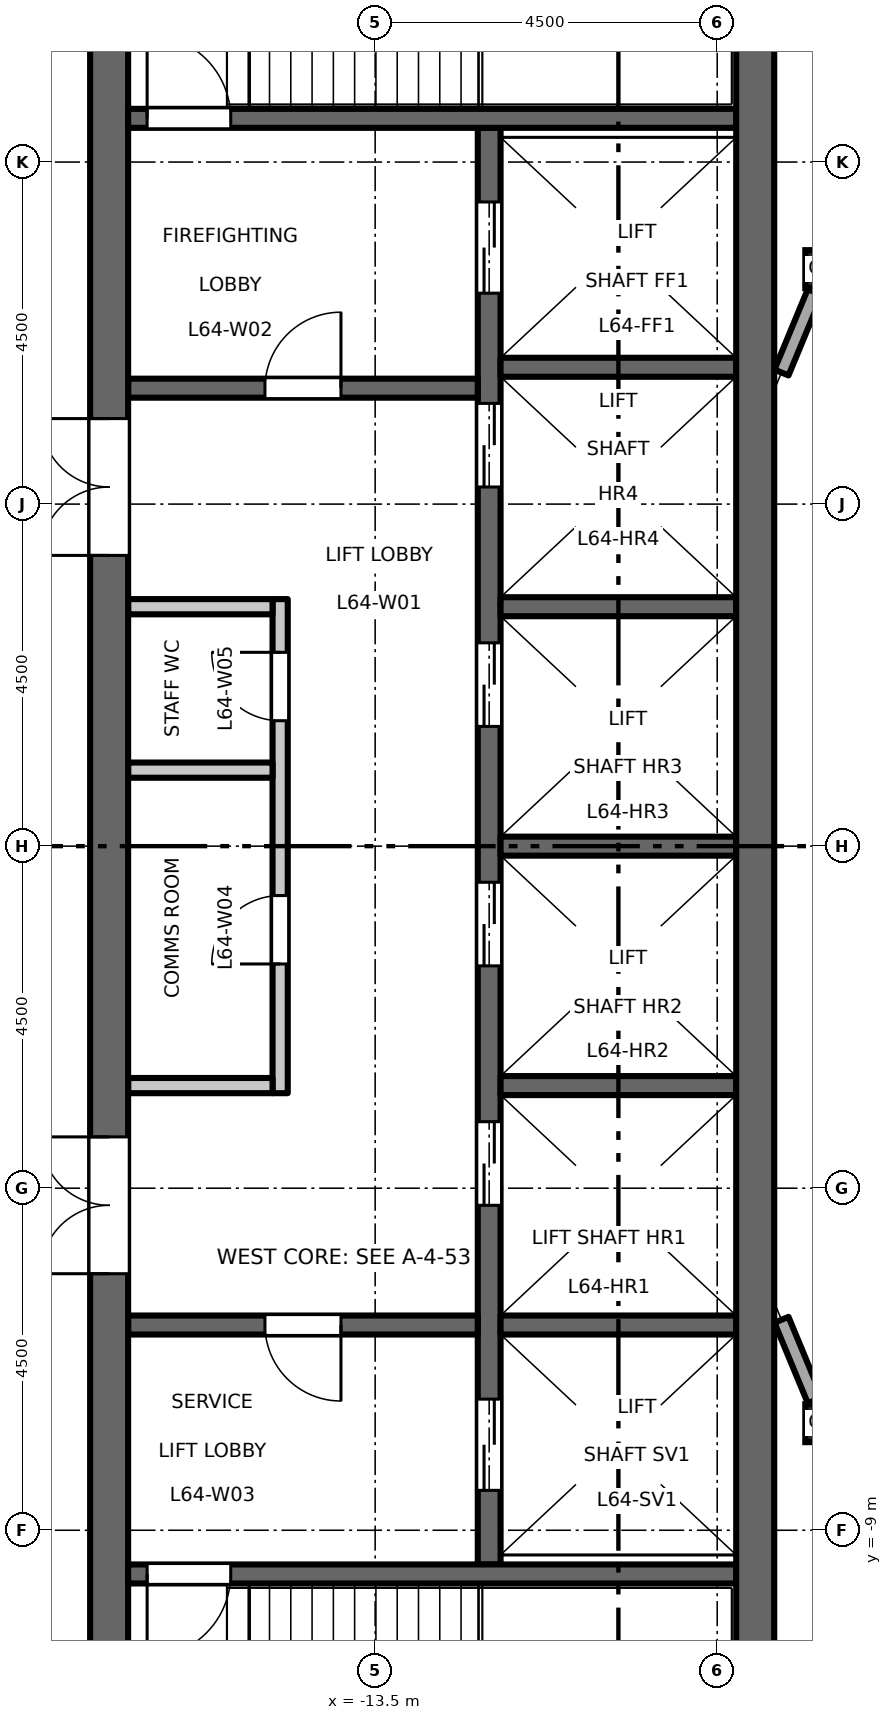
"""IFC4 building model, lengths in metres.
Left out: names, types, materials, properties, quantities, classifications, styles, units other than length and angle.
Written with IfcOpenShell. Run it as: python <this file> out.ifc"""

import sys

from ifc_helpers import new_model, si_unit, direction, frame, frame_2d, origin, origin_2d, place, context, subcontext, project, spatial, rectangle, hollow_rectangle, extrude, element, fill, save


model = new_model("IFC4")
c1 = context("Model", 3, precision=1e-05, world=origin(), true_north=direction((0.0, 1.0)))
c2 = subcontext(c1, "Body", "Model", "MODEL_VIEW")
j1 = project(units=[si_unit("LENGTHUNIT", "METRE"), si_unit("PLANEANGLEUNIT", "RADIAN")], contexts=[c1])
p1 = place(None, origin())
s1 = spatial("IfcSite", under=j1, at=p1, CompositionType="ELEMENT")
p2 = place(p1, origin())
s2 = spatial("IfcBuilding", under=s1, at=p2, CompositionType="ELEMENT")
p3 = place(p2, frame((0.0, 0.0, 298.7)))
s3 = spatial("IfcBuildingStorey", under=s2, at=p3, CompositionType="ELEMENT", Elevation=298.7)
for number, where, z_axis, x_axis in (
    (1, (-7.591, -7.591, 0.0), (0.0, 0.0, 1.0), (1.0, 0.0, 0.0)),
    (2, (-7.591, 7.591, 0.0), (0.0, 0.0, 1.0), (1.0, 0.0, 0.0)),
):
    element("IfcColumn", number, at=place(p3, frame(where, z_axis=z_axis, x_axis=x_axis)), inside=s3, PredefinedType="COLUMN", context=c2, shape_type="SweptSolid", body=[
        extrude(hollow_rectangle(XDim=0.5, YDim=0.5, WallThickness=0.025, at=origin_2d()), origin(), (0.0, 0.0, 1.0), 4.5),
    ])
p4 = place(p3, frame((-14.75, -3.25, 0.0), z_axis=(0.0, 0.0, 1.0), x_axis=(0.0, 1.0, 0.0)))
e3 = element("IfcWall", 3, at=p4, inside=s3, PredefinedType="PARTITIONING", context=c2, shape_type="SweptSolid", body=[
    extrude(rectangle(XDim=6.5, YDim=0.2, at=frame_2d((3.25, 0.0))), origin(), (0.0, 0.0, 1.0), 4.35),
])
p5 = place(p4, frame((1.7, 0.0, 0.0)))
e4 = element("IfcOpeningElement", 4, at=p5, cuts=e3, PredefinedType="OPENING", context=c2, shape_type="SweptSolid", body=[
    extrude(rectangle(XDim=0.9, YDim=2.1, at=frame_2d((0.45, 1.05))), frame((0.0, 0.11, 0.0), z_axis=(0.0, -1.0, 0.0), x_axis=(1.0, 0.0, 0.0)), (0.0, 0.0, 1.0), 0.22),
])
p6 = place(p4, frame((4.9, 0.0, 0.0)))
e5 = element("IfcOpeningElement", 5, at=p6, cuts=e3, PredefinedType="OPENING", context=c2, shape_type="SweptSolid", body=[
    extrude(rectangle(XDim=0.9, YDim=2.1, at=frame_2d((0.45, 1.05))), frame((0.0, 0.11, 0.0), z_axis=(0.0, -1.0, 0.0), x_axis=(1.0, 0.0, 0.0)), (0.0, 0.0, 1.0), 0.22),
])
for number, where, z_axis, x_axis in (
    (6, (-14.85, 3.15, 0.0), (0.0, 0.0, 1.0), (-1.0, 0.0, 0.0)),
    (7, (-14.85, -3.15, 0.0), (0.0, 0.0, 1.0), (-1.0, 0.0, 0.0)),
    (8, (-14.85, 1.0, 0.0), (0.0, 0.0, 1.0), (-1.0, 0.0, 0.0)),
):
    element("IfcWall", number, at=place(p3, frame(where, z_axis=z_axis, x_axis=x_axis)), inside=s3, PredefinedType="PARTITIONING", context=c2, shape_type="SweptSolid", body=[
        extrude(rectangle(XDim=1.9, YDim=0.2, at=frame_2d((0.95, 0.0))), origin(), (0.0, 0.0, 1.0), 4.35),
    ])
p7 = place(p3, frame((-12.0, -9.45, 0.0), z_axis=(0.0, 0.0, 1.0), x_axis=(0.0, 1.0, 0.0)))
e9 = element("IfcWall", 9, at=p7, inside=s3, PredefinedType="SHEAR", context=c2, shape_type="SweptSolid", body=[
    extrude(rectangle(XDim=18.9, YDim=0.3, at=frame_2d((9.45, 0.0))), origin(), (0.0, 0.0, 1.0), 4.35),
])
p8 = place(p7, frame((4.725, 0.0, 0.0)))
e10 = element("IfcOpeningElement", 10, at=p8, cuts=e9, PredefinedType="OPENING", context=c2, shape_type="SweptSolid", body=[
    extrude(rectangle(XDim=1.1, YDim=2.1, at=frame_2d((0.55, 1.05))), frame((0.0, 0.16, 0.0), z_axis=(0.0, -1.0, 0.0), x_axis=(1.0, 0.0, 0.0)), (0.0, 0.0, 1.0), 0.32),
])
p9 = place(p7, frame((7.875, 0.0, 0.0)))
e11 = element("IfcOpeningElement", 11, at=p9, cuts=e9, PredefinedType="OPENING", context=c2, shape_type="SweptSolid", body=[
    extrude(rectangle(XDim=1.1, YDim=2.1, at=frame_2d((0.55, 1.05))), frame((0.0, 0.16, 0.0), z_axis=(0.0, -1.0, 0.0), x_axis=(1.0, 0.0, 0.0)), (0.0, 0.0, 1.0), 0.32),
])
p10 = place(p7, frame((11.025, 0.0, 0.0)))
e12 = element("IfcOpeningElement", 12, at=p10, cuts=e9, PredefinedType="OPENING", context=c2, shape_type="SweptSolid", body=[
    extrude(rectangle(XDim=1.1, YDim=2.1, at=frame_2d((0.55, 1.05))), frame((0.0, 0.16, 0.0), z_axis=(0.0, -1.0, 0.0), x_axis=(1.0, 0.0, 0.0)), (0.0, 0.0, 1.0), 0.32),
])
p11 = place(p7, frame((14.175, 0.0, 0.0)))
e13 = element("IfcOpeningElement", 13, at=p11, cuts=e9, PredefinedType="OPENING", context=c2, shape_type="SweptSolid", body=[
    extrude(rectangle(XDim=1.1, YDim=2.1, at=frame_2d((0.55, 1.05))), frame((0.0, 0.16, 0.0), z_axis=(0.0, -1.0, 0.0), x_axis=(1.0, 0.0, 0.0)), (0.0, 0.0, 1.0), 0.32),
])
p12 = place(p7, frame((16.725, 0.0, 0.0)))
e14 = element("IfcOpeningElement", 14, at=p12, cuts=e9, PredefinedType="OPENING", context=c2, shape_type="SweptSolid", body=[
    extrude(rectangle(XDim=1.2, YDim=2.1, at=frame_2d((0.6, 1.05))), frame((0.0, 0.16, 0.0), z_axis=(0.0, -1.0, 0.0), x_axis=(1.0, 0.0, 0.0)), (0.0, 0.0, 1.0), 0.32),
])
p13 = place(p7, frame((0.975, 0.0, 0.0)))
e15 = element("IfcOpeningElement", 15, at=p13, cuts=e9, PredefinedType="OPENING", context=c2, shape_type="SweptSolid", body=[
    extrude(rectangle(XDim=1.2, YDim=2.1, at=frame_2d((0.6, 1.05))), frame((0.0, 0.16, 0.0), z_axis=(0.0, -1.0, 0.0), x_axis=(1.0, 0.0, 0.0)), (0.0, 0.0, 1.0), 0.32),
])
p14 = place(p3, frame((-12.15, 6.025, 0.0), z_axis=(0.0, 0.0, 1.0), x_axis=(-1.0, 0.0, 0.0)))
e16 = element("IfcWall", 16, at=p14, inside=s3, PredefinedType="SHEAR", context=c2, shape_type="SweptSolid", body=[
    extrude(rectangle(XDim=4.6, YDim=0.25, at=frame_2d((2.3, 0.0))), origin(), (0.0, 0.0, 1.0), 4.35),
])
p15 = place(p14, frame((1.8, 0.0, 0.0)))
e17 = element("IfcOpeningElement", 17, at=p15, cuts=e16, PredefinedType="OPENING", context=c2, shape_type="SweptSolid", body=[
    extrude(rectangle(XDim=1.0, YDim=2.1, at=frame_2d((0.5, 1.05))), frame((0.0, 0.135, 0.0), z_axis=(0.0, -1.0, 0.0), x_axis=(1.0, 0.0, 0.0)), (0.0, 0.0, 1.0), 0.27),
])
p16 = place(p3, frame((-12.15, -6.3, 0.0), z_axis=(0.0, 0.0, 1.0), x_axis=(-1.0, 0.0, 0.0)))
e18 = element("IfcWall", 18, at=p16, inside=s3, PredefinedType="SHEAR", context=c2, shape_type="SweptSolid", body=[
    extrude(rectangle(XDim=4.6, YDim=0.25, at=frame_2d((2.3, 0.0))), origin(), (0.0, 0.0, 1.0), 4.35),
])
p17 = place(p16, frame((1.8, 0.0, 0.0)))
e19 = element("IfcOpeningElement", 19, at=p17, cuts=e18, PredefinedType="OPENING", context=c2, shape_type="SweptSolid", body=[
    extrude(rectangle(XDim=1.0, YDim=2.1, at=frame_2d((0.5, 1.05))), frame((0.0, 0.135, 0.0), z_axis=(0.0, -1.0, 0.0), x_axis=(1.0, 0.0, 0.0)), (0.0, 0.0, 1.0), 0.27),
])
p18 = place(p3, frame((-17.0, -13.0, 0.0), z_axis=(0.0, 0.0, 1.0), x_axis=(0.0, 1.0, 0.0)))
e20 = element("IfcWall", 20, at=p18, inside=s3, PredefinedType="SHEAR", context=c2, shape_type="SweptSolid", body=[
    extrude(rectangle(XDim=26.0, YDim=0.5, at=frame_2d((13.0, 0.0))), origin(), (0.0, 0.0, 1.0), 4.35),
])
p19 = place(p18, frame((16.825, 0.0, 0.0)))
e21 = element("IfcOpeningElement", 21, at=p19, cuts=e20, PredefinedType="OPENING", context=c2, shape_type="SweptSolid", body=[
    extrude(rectangle(XDim=1.8, YDim=2.1, at=frame_2d((0.9, 1.05))), frame((0.0, 0.26, 0.0), z_axis=(0.0, -1.0, 0.0), x_axis=(1.0, 0.0, 0.0)), (0.0, 0.0, 1.0), 0.52),
])
p20 = place(p18, frame((7.375, 0.0, 0.0)))
e22 = element("IfcOpeningElement", 22, at=p20, cuts=e20, PredefinedType="OPENING", context=c2, shape_type="SweptSolid", body=[
    extrude(rectangle(XDim=1.8, YDim=2.1, at=frame_2d((0.9, 1.05))), frame((0.0, 0.26, 0.0), z_axis=(0.0, -1.0, 0.0), x_axis=(1.0, 0.0, 0.0)), (0.0, 0.0, 1.0), 0.52),
])
for number, where, z_axis, x_axis in (
    (23, (-8.75, 0.0, 0.0), (0.0, 0.0, 1.0), (-1.0, 0.0, 0.0)),
    (24, (-8.75, 3.15, 0.0), (0.0, 0.0, 1.0), (-1.0, 0.0, 0.0)),
    (25, (-8.75, 6.3, 0.0), (0.0, 0.0, 1.0), (-1.0, 0.0, 0.0)),
    (26, (-8.75, -3.15, 0.0), (0.0, 0.0, 1.0), (-1.0, 0.0, 0.0)),
    (27, (-8.75, -6.3, 0.0), (0.0, 0.0, 1.0), (-1.0, 0.0, 0.0)),
):
    element("IfcWall", number, at=place(p3, frame(where, z_axis=z_axis, x_axis=x_axis)), inside=s3, PredefinedType="SHEAR", context=c2, shape_type="SweptSolid", body=[
        extrude(rectangle(XDim=3.1, YDim=0.25, at=frame_2d((1.55, 0.0))), origin(), (0.0, 0.0, 1.0), 4.35),
    ])
p21 = place(p3, frame((-8.75, 9.575, 0.0), z_axis=(0.0, 0.0, 1.0), x_axis=(-1.0, 0.0, 0.0)))
e28 = element("IfcWall", 28, at=p21, inside=s3, PredefinedType="SHEAR", context=c2, shape_type="SweptSolid", body=[
    extrude(rectangle(XDim=8.0, YDim=0.25, at=frame_2d((4.0, 0.0))), origin(), (0.0, 0.0, 1.0), 4.35),
])
p22 = place(p21, frame((6.65, 0.0, 0.0)))
e29 = element("IfcOpeningElement", 29, at=p22, cuts=e28, PredefinedType="OPENING", context=c2, shape_type="SweptSolid", body=[
    extrude(rectangle(XDim=1.1, YDim=2.1, at=frame_2d((0.55, 1.05))), frame((0.0, 0.135, 0.0), z_axis=(0.0, -1.0, 0.0), x_axis=(1.0, 0.0, 0.0)), (0.0, 0.0, 1.0), 0.27),
])
p23 = place(p3, frame((-8.75, -9.575, 0.0), z_axis=(0.0, 0.0, 1.0), x_axis=(-1.0, 0.0, 0.0)))
e30 = element("IfcWall", 30, at=p23, inside=s3, PredefinedType="SHEAR", context=c2, shape_type="SweptSolid", body=[
    extrude(rectangle(XDim=8.0, YDim=0.25, at=frame_2d((4.0, 0.0))), origin(), (0.0, 0.0, 1.0), 4.35),
])
p24 = place(p23, frame((6.65, 0.0, 0.0)))
e31 = element("IfcOpeningElement", 31, at=p24, cuts=e30, PredefinedType="OPENING", context=c2, shape_type="SweptSolid", body=[
    extrude(rectangle(XDim=1.1, YDim=2.1, at=frame_2d((0.55, 1.05))), frame((0.0, 0.135, 0.0), z_axis=(0.0, -1.0, 0.0), x_axis=(1.0, 0.0, 0.0)), (0.0, 0.0, 1.0), 0.27),
])
p25 = place(p3, frame((-8.5, -13.0, 0.0), z_axis=(0.0, 0.0, 1.0), x_axis=(0.0, 1.0, 0.0)))
e32 = element("IfcWall", 32, at=p25, inside=s3, PredefinedType="SHEAR", context=c2, shape_type="SweptSolid", body=[
    extrude(rectangle(XDim=26.0, YDim=0.5, at=frame_2d((13.0, 0.0))), origin(), (0.0, 0.0, 1.0), 4.35),
])
for number, where, z_axis, x_axis in (
    (33, (-7.716, 7.289, 0.0), (0.0, 0.0, 1.0), (-0.383, -0.924, 0.0)),
    (34, (-8.154, -6.231, 0.0), (0.0, 0.0, 1.0), (0.383, -0.924, 0.0)),
):
    element("IfcWall", number, at=place(p3, frame(where, z_axis=z_axis, x_axis=x_axis)), inside=s3, PredefinedType="STANDARD", context=c2, shape_type="SweptSolid", body=[
        extrude(rectangle(XDim=1.146, YDim=0.2, at=frame_2d((0.573, 0.0))), origin(), (0.0, 0.0, 1.0), 4.01),
    ])
p26 = place(p15, origin())
e35 = element("IfcDoor", 35, at=p26, inside=s3, OperationType="SINGLE_SWING_LEFT", PredefinedType="DOOR", context=c2, shape_type="SweptSolid", body=[
    extrude(rectangle(XDim=1.0, YDim=2.1, at=frame_2d((0.5, 1.05))), frame((0.0, 0.025, 0.0), z_axis=(0.0, -1.0, 0.0), x_axis=(1.0, 0.0, 0.0)), (0.0, 0.0, 1.0), 0.05),
])
fill(e17, e35)
p27 = place(p17, origin())
e36 = element("IfcDoor", 36, at=p27, inside=s3, OperationType="SINGLE_SWING_RIGHT", PredefinedType="DOOR", context=c2, shape_type="SweptSolid", body=[
    extrude(rectangle(XDim=1.0, YDim=2.1, at=frame_2d((0.5, 1.05))), frame((0.0, 0.025, 0.0), z_axis=(0.0, -1.0, 0.0), x_axis=(1.0, 0.0, 0.0)), (0.0, 0.0, 1.0), 0.05),
])
fill(e19, e36)
p28 = place(p22, origin())
e37 = element("IfcDoor", 37, at=p28, inside=s3, OperationType="SINGLE_SWING_RIGHT", PredefinedType="DOOR", context=c2, shape_type="SweptSolid", body=[
    extrude(rectangle(XDim=1.1, YDim=2.1, at=frame_2d((0.55, 1.05))), frame((0.0, 0.025, 0.0), z_axis=(0.0, -1.0, 0.0), x_axis=(1.0, 0.0, 0.0)), (0.0, 0.0, 1.0), 0.05),
])
fill(e29, e37)
p29 = place(p24, origin())
e38 = element("IfcDoor", 38, at=p29, inside=s3, OperationType="SINGLE_SWING_LEFT", PredefinedType="DOOR", context=c2, shape_type="SweptSolid", body=[
    extrude(rectangle(XDim=1.1, YDim=2.1, at=frame_2d((0.55, 1.05))), frame((0.0, 0.025, 0.0), z_axis=(0.0, -1.0, 0.0), x_axis=(1.0, 0.0, 0.0)), (0.0, 0.0, 1.0), 0.05),
])
fill(e31, e38)
p30 = place(p19, origin())
e39 = element("IfcDoor", 39, at=p30, inside=s3, OperationType="DOUBLE_DOOR_DOUBLE_SWING", PredefinedType="DOOR", context=c2, shape_type="SweptSolid", body=[
    extrude(rectangle(XDim=1.8, YDim=2.1, at=frame_2d((0.9, 1.05))), frame((0.0, 0.025, 0.0), z_axis=(0.0, -1.0, 0.0), x_axis=(1.0, 0.0, 0.0)), (0.0, 0.0, 1.0), 0.05),
])
fill(e21, e39)
p31 = place(p20, origin())
e40 = element("IfcDoor", 40, at=p31, inside=s3, OperationType="DOUBLE_DOOR_DOUBLE_SWING", PredefinedType="DOOR", context=c2, shape_type="SweptSolid", body=[
    extrude(rectangle(XDim=1.8, YDim=2.1, at=frame_2d((0.9, 1.05))), frame((0.0, 0.025, 0.0), z_axis=(0.0, -1.0, 0.0), x_axis=(1.0, 0.0, 0.0)), (0.0, 0.0, 1.0), 0.05),
])
fill(e22, e40)
p32 = place(p8, origin())
e41 = element("IfcDoor", 41, at=p32, inside=s3, OperationType="DOUBLE_DOOR_SLIDING", PredefinedType="DOOR", context=c2, shape_type="SweptSolid", body=[
    extrude(rectangle(XDim=1.1, YDim=2.1, at=frame_2d((0.55, 1.05))), frame((0.0, 0.025, 0.0), z_axis=(0.0, -1.0, 0.0), x_axis=(1.0, 0.0, 0.0)), (0.0, 0.0, 1.0), 0.05),
])
fill(e10, e41)
p33 = place(p9, origin())
e42 = element("IfcDoor", 42, at=p33, inside=s3, OperationType="DOUBLE_DOOR_SLIDING", PredefinedType="DOOR", context=c2, shape_type="SweptSolid", body=[
    extrude(rectangle(XDim=1.1, YDim=2.1, at=frame_2d((0.55, 1.05))), frame((0.0, 0.025, 0.0), z_axis=(0.0, -1.0, 0.0), x_axis=(1.0, 0.0, 0.0)), (0.0, 0.0, 1.0), 0.05),
])
fill(e11, e42)
p34 = place(p10, origin())
e43 = element("IfcDoor", 43, at=p34, inside=s3, OperationType="DOUBLE_DOOR_SLIDING", PredefinedType="DOOR", context=c2, shape_type="SweptSolid", body=[
    extrude(rectangle(XDim=1.1, YDim=2.1, at=frame_2d((0.55, 1.05))), frame((0.0, 0.025, 0.0), z_axis=(0.0, -1.0, 0.0), x_axis=(1.0, 0.0, 0.0)), (0.0, 0.0, 1.0), 0.05),
])
fill(e12, e43)
p35 = place(p11, origin())
e44 = element("IfcDoor", 44, at=p35, inside=s3, OperationType="DOUBLE_DOOR_SLIDING", PredefinedType="DOOR", context=c2, shape_type="SweptSolid", body=[
    extrude(rectangle(XDim=1.1, YDim=2.1, at=frame_2d((0.55, 1.05))), frame((0.0, 0.025, 0.0), z_axis=(0.0, -1.0, 0.0), x_axis=(1.0, 0.0, 0.0)), (0.0, 0.0, 1.0), 0.05),
])
fill(e13, e44)
p36 = place(p12, origin())
e45 = element("IfcDoor", 45, at=p36, inside=s3, OperationType="DOUBLE_DOOR_SLIDING", PredefinedType="DOOR", context=c2, shape_type="SweptSolid", body=[
    extrude(rectangle(XDim=1.2, YDim=2.1, at=frame_2d((0.6, 1.05))), frame((0.0, 0.025, 0.0), z_axis=(0.0, -1.0, 0.0), x_axis=(1.0, 0.0, 0.0)), (0.0, 0.0, 1.0), 0.05),
])
fill(e14, e45)
p37 = place(p13, origin())
e46 = element("IfcDoor", 46, at=p37, inside=s3, OperationType="DOUBLE_DOOR_SLIDING", PredefinedType="DOOR", context=c2, shape_type="SweptSolid", body=[
    extrude(rectangle(XDim=1.2, YDim=2.1, at=frame_2d((0.6, 1.05))), frame((0.0, 0.025, 0.0), z_axis=(0.0, -1.0, 0.0), x_axis=(1.0, 0.0, 0.0)), (0.0, 0.0, 1.0), 0.05),
])
fill(e15, e46)
p38 = place(p5, origin())
e47 = element("IfcDoor", 47, at=p38, inside=s3, OperationType="SINGLE_SWING_RIGHT", PredefinedType="DOOR", context=c2, shape_type="SweptSolid", body=[
    extrude(rectangle(XDim=0.9, YDim=2.1, at=frame_2d((0.45, 1.05))), frame((0.0, 0.025, 0.0), z_axis=(0.0, -1.0, 0.0), x_axis=(1.0, 0.0, 0.0)), (0.0, 0.0, 1.0), 0.05),
])
fill(e4, e47)
p39 = place(p6, origin())
e48 = element("IfcDoor", 48, at=p39, inside=s3, OperationType="SINGLE_SWING_LEFT", PredefinedType="DOOR", context=c2, shape_type="SweptSolid", body=[
    extrude(rectangle(XDim=0.9, YDim=2.1, at=frame_2d((0.45, 1.05))), frame((0.0, 0.025, 0.0), z_axis=(0.0, -1.0, 0.0), x_axis=(1.0, 0.0, 0.0)), (0.0, 0.0, 1.0), 0.05),
])
fill(e5, e48)
save(model, sys.argv[1])
